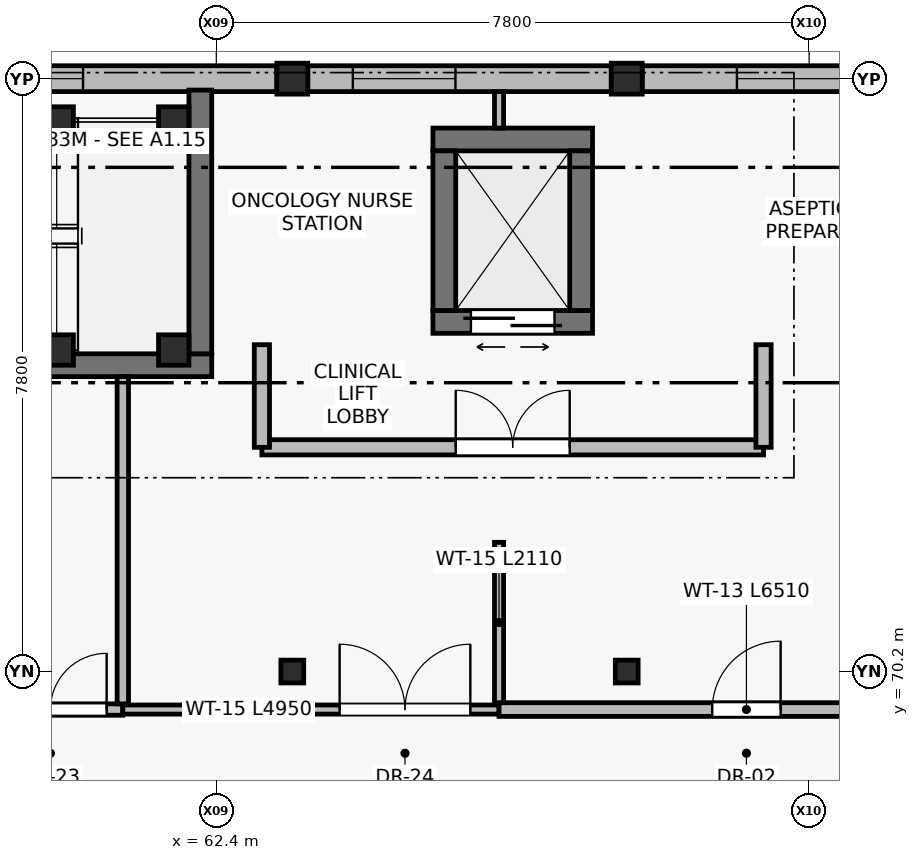
"""IFC4 building model, lengths in metres.
Left out: names, types, materials, properties, quantities, classifications, styles, units other than length and angle.
Written with IfcOpenShell. Run it as: python <this file> out.ifc"""

import sys

from ifc_helpers import new_model, si_unit, direction, frame, frame_2d, origin, origin_2d, place, context, subcontext, project, spatial, rectangle, hollow_circle, i_section, extrude, element, fill, save


model = new_model("IFC4")
c1 = context("Model", 3, precision=1e-05, world=origin(), true_north=direction((0.0, 1.0)))
c2 = subcontext(c1, "Body", "Model", "MODEL_VIEW")
j1 = project(units=[si_unit("LENGTHUNIT", "METRE"), si_unit("PLANEANGLEUNIT", "RADIAN")], contexts=[c1])
p1 = place(None, origin())
s1 = spatial("IfcSite", under=j1, at=p1, CompositionType="ELEMENT")
p2 = place(p1, origin())
s2 = spatial("IfcBuilding", under=s1, at=p2, CompositionType="ELEMENT")
p3 = place(p2, origin())
s3 = spatial("IfcBuildingStorey", under=s2, at=p3, CompositionType="ELEMENT", Elevation=0.0)
for number, where, z_axis, x_axis in (
    (1, (63.4, 78.0, 0.0), (0.0, 0.0, 1.0), (1.0, 0.0, 0.0)),
    (2, (67.8, 78.0, 0.0), (0.0, 0.0, 1.0), (1.0, 0.0, 0.0)),
):
    element("IfcColumn", number, at=place(p3, frame(where, z_axis=z_axis, x_axis=x_axis)), inside=s3, PredefinedType="COLUMN", context=c2, shape_type="SweptSolid", body=[
        extrude(hollow_circle(Radius=0.203, WallThickness=0.016, at=origin_2d()), origin(), (0.0, 0.0, 1.0), 4.8),
    ])
for number, where, z_axis, x_axis in (
    (3, (63.4, 70.2, 0.0), (0.0, 0.0, 1.0), (1.0, 0.0, 0.0)),
    (4, (67.8, 70.2, 0.0), (0.0, 0.0, 1.0), (1.0, 0.0, 0.0)),
):
    element("IfcColumn", number, at=place(p3, frame(where, z_axis=z_axis, x_axis=x_axis)), inside=s3, PredefinedType="COLUMN", context=c2, shape_type="SweptSolid", body=[
        extrude(i_section(OverallWidth=0.3, OverallDepth=0.3, WebThickness=0.011, FlangeThickness=0.019, at=origin_2d()), origin(), (0.0, 0.0, 1.0), 4.8),
    ])
for number, where, z_axis, x_axis in (
    (5, (60.32, 74.43, 0.0), (0.0, 0.0, 1.0), (1.0, 0.0, 0.0)),
    (6, (60.32, 77.43, 0.0), (0.0, 0.0, 1.0), (1.0, 0.0, 0.0)),
    (7, (61.84, 74.43, 0.0), (0.0, 0.0, 1.0), (1.0, 0.0, 0.0)),
    (8, (61.84, 77.43, 0.0), (0.0, 0.0, 1.0), (1.0, 0.0, 0.0)),
):
    element("IfcColumn", number, at=place(p3, frame(where, z_axis=z_axis, x_axis=x_axis)), inside=s3, PredefinedType="COLUMN", context=c2, shape_type="SweptSolid", body=[
        extrude(rectangle(XDim=0.4, YDim=0.4, at=origin_2d()), origin(), (0.0, 0.0, 1.0), 4.8),
    ])
p4 = place(p3, frame((59.203, 78.0, 0.0), z_axis=(0.0, 0.0, 1.0), x_axis=(1.0, 0.0, 0.0)))
e9 = element("IfcWall", 9, at=p4, inside=s3, PredefinedType="STANDARD", context=c2, shape_type="SweptSolid", body=[
    extrude(rectangle(XDim=3.994, YDim=0.34, at=frame_2d((1.997, 0.0))), origin(), (0.0, 0.0, 1.0), 4.14),
])
p5 = place(p4, frame((0.543, 0.0, 0.9)))
e10 = element("IfcOpeningElement", 10, at=p5, cuts=e9, PredefinedType="OPENING", context=c2, shape_type="SweptSolid", body=[
    extrude(rectangle(XDim=0.9, YDim=1.6, at=frame_2d((0.45, 0.8))), frame((0.0, 0.18, 0.0), z_axis=(0.0, -1.0, 0.0), x_axis=(1.0, 0.0, 0.0)), (0.0, 0.0, 1.0), 0.36),
])
p6 = place(p3, frame((63.603, 78.0, 0.0), z_axis=(0.0, 0.0, 1.0), x_axis=(1.0, 0.0, 0.0)))
e11 = element("IfcWall", 11, at=p6, inside=s3, PredefinedType="STANDARD", context=c2, shape_type="SweptSolid", body=[
    extrude(rectangle(XDim=3.993, YDim=0.34, at=frame_2d((1.997, 0.0))), origin(), (0.0, 0.0, 1.0), 4.14),
])
p7 = place(p6, frame((0.594, 0.0, 0.9)))
e12 = element("IfcOpeningElement", 12, at=p7, cuts=e11, PredefinedType="OPENING", context=c2, shape_type="SweptSolid", body=[
    extrude(rectangle(XDim=1.35, YDim=1.75, at=frame_2d((0.675, 0.875))), frame((0.0, 0.18, 0.0), z_axis=(0.0, -1.0, 0.0), x_axis=(1.0, 0.0, 0.0)), (0.0, 0.0, 1.0), 0.36),
])
p8 = place(p3, frame((68.003, 78.0, 0.0), z_axis=(0.0, 0.0, 1.0), x_axis=(1.0, 0.0, 0.0)))
e13 = element("IfcWall", 13, at=p8, inside=s3, PredefinedType="STANDARD", context=c2, shape_type="SweptSolid", body=[
    extrude(rectangle(XDim=3.994, YDim=0.34, at=frame_2d((1.997, 0.0))), origin(), (0.0, 0.0, 1.0), 4.14),
])
p9 = place(p8, frame((1.247, 0.0, 0.9)))
e14 = element("IfcOpeningElement", 14, at=p9, cuts=e13, PredefinedType="OPENING", context=c2, shape_type="SweptSolid", body=[
    extrude(rectangle(XDim=1.5, YDim=1.85, at=frame_2d((0.75, 0.925))), frame((0.0, 0.18, 0.0), z_axis=(0.0, -1.0, 0.0), x_axis=(1.0, 0.0, 0.0)), (0.0, 0.0, 1.0), 0.36),
])
p10 = place(p3, frame((54.75, 74.23, 0.0), z_axis=(0.0, 0.0, 1.0), x_axis=(1.0, 0.0, 0.0)))
e15 = element("IfcWall", 15, at=p10, inside=s3, PredefinedType="SHEAR", context=c2, shape_type="SweptSolid", body=[
    extrude(rectangle(XDim=7.59, YDim=0.3, at=frame_2d((3.795, 0.0))), origin(), (0.0, 0.0, 1.0), 4.54),
])
p11 = place(p10, frame((0.59, 0.0, 0.0)))
e16 = element("IfcOpeningElement", 16, at=p11, cuts=e15, PredefinedType="OPENING", context=c2, shape_type="SweptSolid", body=[
    extrude(rectangle(XDim=1.4, YDim=2.2, at=frame_2d((0.7, 1.1))), frame((0.0, 0.16, 0.0), z_axis=(0.0, -1.0, 0.0), x_axis=(1.0, 0.0, 0.0)), (0.0, 0.0, 1.0), 0.32),
])
p12 = place(p3, frame((62.19, 74.38, 0.0), z_axis=(0.0, 0.0, 1.0), x_axis=(0.0, 1.0, 0.0)))
e17 = element("IfcWall", 17, at=p12, inside=s3, PredefinedType="SHEAR", context=c2, shape_type="SweptSolid", body=[
    extrude(rectangle(XDim=3.47, YDim=0.3, at=frame_2d((1.735, 0.0))), origin(), (0.0, 0.0, 1.0), 4.54),
])
p13 = place(p3, frame((65.25, 74.8, 0.0), z_axis=(0.0, 0.0, 1.0), x_axis=(1.0, 0.0, 0.0)))
e18 = element("IfcWall", 18, at=p13, inside=s3, PredefinedType="SHEAR", context=c2, shape_type="SweptSolid", body=[
    extrude(rectangle(XDim=2.1, YDim=0.3, at=frame_2d((1.05, 0.0))), origin(), (0.0, 0.0, 1.0), 4.54),
])
p14 = place(p13, frame((0.5, 0.0, 0.0)))
e19 = element("IfcOpeningElement", 19, at=p14, cuts=e18, PredefinedType="OPENING", context=c2, shape_type="SweptSolid", body=[
    extrude(rectangle(XDim=1.1, YDim=2.2, at=frame_2d((0.55, 1.1))), frame((0.0, 0.16, 0.0), z_axis=(0.0, -1.0, 0.0), x_axis=(1.0, 0.0, 0.0)), (0.0, 0.0, 1.0), 0.32),
])
for number, where, z_axis, x_axis in (
    (20, (67.35, 77.2, 0.0), (0.0, 0.0, 1.0), (-1.0, 0.0, 0.0)),
    (21, (65.4, 77.05, 0.0), (0.0, 0.0, 1.0), (0.0, -1.0, 0.0)),
    (22, (67.2, 74.95, 0.0), (0.0, 0.0, 1.0), (0.0, 1.0, 0.0)),
):
    element("IfcWall", number, at=place(p3, frame(where, z_axis=z_axis, x_axis=x_axis)), inside=s3, PredefinedType="SHEAR", context=c2, shape_type="SweptSolid", body=[
        extrude(rectangle(XDim=2.1, YDim=0.3, at=frame_2d((1.05, 0.0))), origin(), (0.0, 0.0, 1.0), 4.54),
    ])
p15 = place(p3, frame((63.0, 73.15, 0.0), z_axis=(0.0, 0.0, 1.0), x_axis=(1.0, 0.0, 0.0)))
e23 = element("IfcWall", 23, at=p15, inside=s3, PredefinedType="SOLIDWALL", context=c2, shape_type="SweptSolid", body=[
    extrude(rectangle(XDim=6.6, YDim=0.2, at=frame_2d((3.3, 0.0))), origin(), (0.0, 0.0, 1.0), 4.54),
])
p16 = place(p15, frame((2.55, 0.0, 0.0)))
e24 = element("IfcOpeningElement", 24, at=p16, cuts=e23, PredefinedType="OPENING", context=c2, shape_type="SweptSolid", body=[
    extrude(rectangle(XDim=1.5, YDim=2.2, at=frame_2d((0.75, 1.1))), frame((0.0, 0.11, 0.0), z_axis=(0.0, -1.0, 0.0), x_axis=(1.0, 0.0, 0.0)), (0.0, 0.0, 1.0), 0.22),
])
p17 = place(p3, frame((63.0, 74.5, 0.0), z_axis=(0.0, 0.0, 1.0), x_axis=(0.0, -1.0, 0.0)))
e25 = element("IfcWall", 25, at=p17, inside=s3, PredefinedType="SOLIDWALL", context=c2, shape_type="SweptSolid", body=[
    extrude(rectangle(XDim=1.35, YDim=0.2, at=frame_2d((0.675, 0.0))), origin(), (0.0, 0.0, 1.0), 4.09),
])
p18 = place(p3, frame((69.6, 73.15, 0.0), z_axis=(0.0, 0.0, 1.0), x_axis=(0.0, 1.0, 0.0)))
e26 = element("IfcWall", 26, at=p18, inside=s3, PredefinedType="SOLIDWALL", context=c2, shape_type="SweptSolid", body=[
    extrude(rectangle(XDim=1.35, YDim=0.2, at=frame_2d((0.675, 0.0))), origin(), (0.0, 0.0, 1.0), 4.21),
])
p19 = place(p3, frame((57.36, 69.7, 0.0), z_axis=(0.0, 0.0, 1.0), x_axis=(1.0, 0.0, 0.0)))
e27 = element("IfcWall", 27, at=p19, inside=s3, PredefinedType="PARTITIONING", context=c2, shape_type="SweptSolid", body=[
    extrude(rectangle(XDim=3.81, YDim=0.15, at=frame_2d((1.905, 0.0))), origin(), (0.0, 0.0, 1.0), 4.54),
])
p20 = place(p19, frame((2.117, 0.0, 0.0)))
e28 = element("IfcOpeningElement", 28, at=p20, cuts=e27, PredefinedType="OPENING", context=c2, shape_type="SweptSolid", body=[
    extrude(rectangle(XDim=1.48, YDim=2.25, at=frame_2d((0.74, 1.125))), frame((0.0, 0.085, 0.0), z_axis=(0.0, -1.0, 0.0), x_axis=(1.0, 0.0, 0.0)), (0.0, 0.0, 1.0), 0.17),
])
p21 = place(p3, frame((61.17, 69.7, 0.0), z_axis=(0.0, 0.0, 1.0), x_axis=(1.0, 0.0, 0.0)))
e29 = element("IfcWall", 29, at=p21, inside=s3, PredefinedType="PARTITIONING", context=c2, shape_type="SweptSolid", body=[
    extrude(rectangle(XDim=4.95, YDim=0.12, at=frame_2d((2.475, 0.0))), origin(), (0.0, 0.0, 1.0), 4.54),
])
p22 = place(p21, frame((2.853, 0.0, 0.0)))
e30 = element("IfcOpeningElement", 30, at=p22, cuts=e29, PredefinedType="OPENING", context=c2, shape_type="SweptSolid", body=[
    extrude(rectangle(XDim=1.72, YDim=2.3, at=frame_2d((0.86, 1.15))), frame((0.0, 0.07, 0.0), z_axis=(0.0, -1.0, 0.0), x_axis=(1.0, 0.0, 0.0)), (0.0, 0.0, 1.0), 0.14),
])
p23 = place(p3, frame((66.12, 69.7, 0.0), z_axis=(0.0, 0.0, 1.0), x_axis=(1.0, 0.0, 0.0)))
e31 = element("IfcWall", 31, at=p23, inside=s3, PredefinedType="PARTITIONING", context=c2, shape_type="SweptSolid", body=[
    extrude(rectangle(XDim=6.51, YDim=0.18, at=frame_2d((3.255, 0.0))), origin(), (0.0, 0.0, 1.0), 4.54),
])
p24 = place(p23, frame((2.805, 0.0, 0.0)))
e32 = element("IfcOpeningElement", 32, at=p24, cuts=e31, PredefinedType="OPENING", context=c2, shape_type="SweptSolid", body=[
    extrude(rectangle(XDim=0.9, YDim=2.1, at=frame_2d((0.45, 1.05))), frame((0.0, 0.1, 0.0), z_axis=(0.0, -1.0, 0.0), x_axis=(1.0, 0.0, 0.0)), (0.0, 0.0, 1.0), 0.2),
])
p25 = place(p3, frame((61.17, 69.775, 0.0), z_axis=(0.0, 0.0, 1.0), x_axis=(0.0, 1.0, 0.0)))
e33 = element("IfcWall", 33, at=p25, inside=s3, PredefinedType="PARTITIONING", context=c2, shape_type="SweptSolid", body=[
    extrude(rectangle(XDim=4.305, YDim=0.15, at=frame_2d((2.153, 0.0))), origin(), (0.0, 0.0, 1.0), 4.54),
])
p26 = place(p3, frame((66.12, 69.79, 0.0), z_axis=(0.0, 0.0, 1.0), x_axis=(0.0, 1.0, 0.0)))
e34 = element("IfcWall", 34, at=p26, inside=s3, PredefinedType="PARTITIONING", context=c2, shape_type="SweptSolid", body=[
    extrude(rectangle(XDim=2.11, YDim=0.12, at=frame_2d((1.055, 0.0))), origin(), (0.0, 0.0, 1.0), 4.54),
])
p27 = place(p3, frame((66.12, 77.35, 0.0), z_axis=(0.0, 0.0, 1.0), x_axis=(0.0, 1.0, 0.0)))
e35 = element("IfcWall", 35, at=p27, inside=s3, PredefinedType="PARTITIONING", context=c2, shape_type="SweptSolid", body=[
    extrude(rectangle(XDim=0.48, YDim=0.12, at=frame_2d((0.24, 0.0))), origin(), (0.0, 0.0, 1.0), 4.54),
])
p28 = place(p5, origin())
e36 = element("IfcWindow", 36, at=p28, inside=s3, PartitioningType="SINGLE_PANEL", PredefinedType="WINDOW", context=c2, shape_type="SweptSolid", body=[
    extrude(rectangle(XDim=0.9, YDim=1.6, at=frame_2d((0.45, 0.8))), frame((0.0, 0.03, 0.0), z_axis=(0.0, -1.0, 0.0), x_axis=(1.0, 0.0, 0.0)), (0.0, 0.0, 1.0), 0.06),
])
fill(e10, e36)
p29 = place(p7, origin())
e37 = element("IfcWindow", 37, at=p29, inside=s3, PartitioningType="SINGLE_PANEL", PredefinedType="WINDOW", context=c2, shape_type="SweptSolid", body=[
    extrude(rectangle(XDim=1.35, YDim=1.75, at=frame_2d((0.675, 0.875))), frame((0.0, 0.03, 0.0), z_axis=(0.0, -1.0, 0.0), x_axis=(1.0, 0.0, 0.0)), (0.0, 0.0, 1.0), 0.06),
])
fill(e12, e37)
p30 = place(p9, origin())
e38 = element("IfcWindow", 38, at=p30, inside=s3, PartitioningType="SINGLE_PANEL", PredefinedType="WINDOW", context=c2, shape_type="SweptSolid", body=[
    extrude(rectangle(XDim=1.5, YDim=1.85, at=frame_2d((0.75, 0.925))), frame((0.0, 0.03, 0.0), z_axis=(0.0, -1.0, 0.0), x_axis=(1.0, 0.0, 0.0)), (0.0, 0.0, 1.0), 0.06),
])
fill(e14, e38)
p31 = place(p14, origin())
e39 = element("IfcDoor", 39, at=p31, inside=s3, OperationType="DOUBLE_DOOR_SLIDING", PredefinedType="DOOR", context=c2, shape_type="SweptSolid", body=[
    extrude(rectangle(XDim=1.1, YDim=2.2, at=frame_2d((0.55, 1.1))), frame((0.0, 0.025, 0.0), z_axis=(0.0, -1.0, 0.0), x_axis=(1.0, 0.0, 0.0)), (0.0, 0.0, 1.0), 0.05),
])
fill(e19, e39)
p32 = place(p16, origin())
e40 = element("IfcDoor", 40, at=p32, inside=s3, OperationType="DOUBLE_DOOR_SINGLE_SWING", PredefinedType="DOOR", context=c2, shape_type="SweptSolid", body=[
    extrude(rectangle(XDim=1.5, YDim=2.2, at=frame_2d((0.75, 1.1))), frame((0.0, 0.025, 0.0), z_axis=(0.0, -1.0, 0.0), x_axis=(1.0, 0.0, 0.0)), (0.0, 0.0, 1.0), 0.05),
])
fill(e24, e40)
p33 = place(p20, origin())
e41 = element("IfcDoor", 41, at=p33, inside=s3, OperationType="DOUBLE_DOOR_SINGLE_SWING", PredefinedType="DOOR", context=c2, shape_type="SweptSolid", body=[
    extrude(rectangle(XDim=1.48, YDim=2.25, at=frame_2d((0.74, 1.125))), frame((0.0, 0.025, 0.0), z_axis=(0.0, -1.0, 0.0), x_axis=(1.0, 0.0, 0.0)), (0.0, 0.0, 1.0), 0.05),
])
fill(e28, e41)
p34 = place(p22, origin())
e42 = element("IfcDoor", 42, at=p34, inside=s3, OperationType="DOUBLE_DOOR_SINGLE_SWING", PredefinedType="DOOR", context=c2, shape_type="SweptSolid", body=[
    extrude(rectangle(XDim=1.72, YDim=2.3, at=frame_2d((0.86, 1.15))), frame((0.0, 0.025, 0.0), z_axis=(0.0, -1.0, 0.0), x_axis=(1.0, 0.0, 0.0)), (0.0, 0.0, 1.0), 0.05),
])
fill(e30, e42)
p35 = place(p24, origin())
e43 = element("IfcDoor", 43, at=p35, inside=s3, OperationType="SINGLE_SWING_RIGHT", PredefinedType="DOOR", context=c2, shape_type="SweptSolid", body=[
    extrude(rectangle(XDim=0.9, YDim=2.1, at=frame_2d((0.45, 1.05))), frame((0.0, 0.025, 0.0), z_axis=(0.0, -1.0, 0.0), x_axis=(1.0, 0.0, 0.0)), (0.0, 0.0, 1.0), 0.05),
])
fill(e32, e43)
save(model, sys.argv[1])
